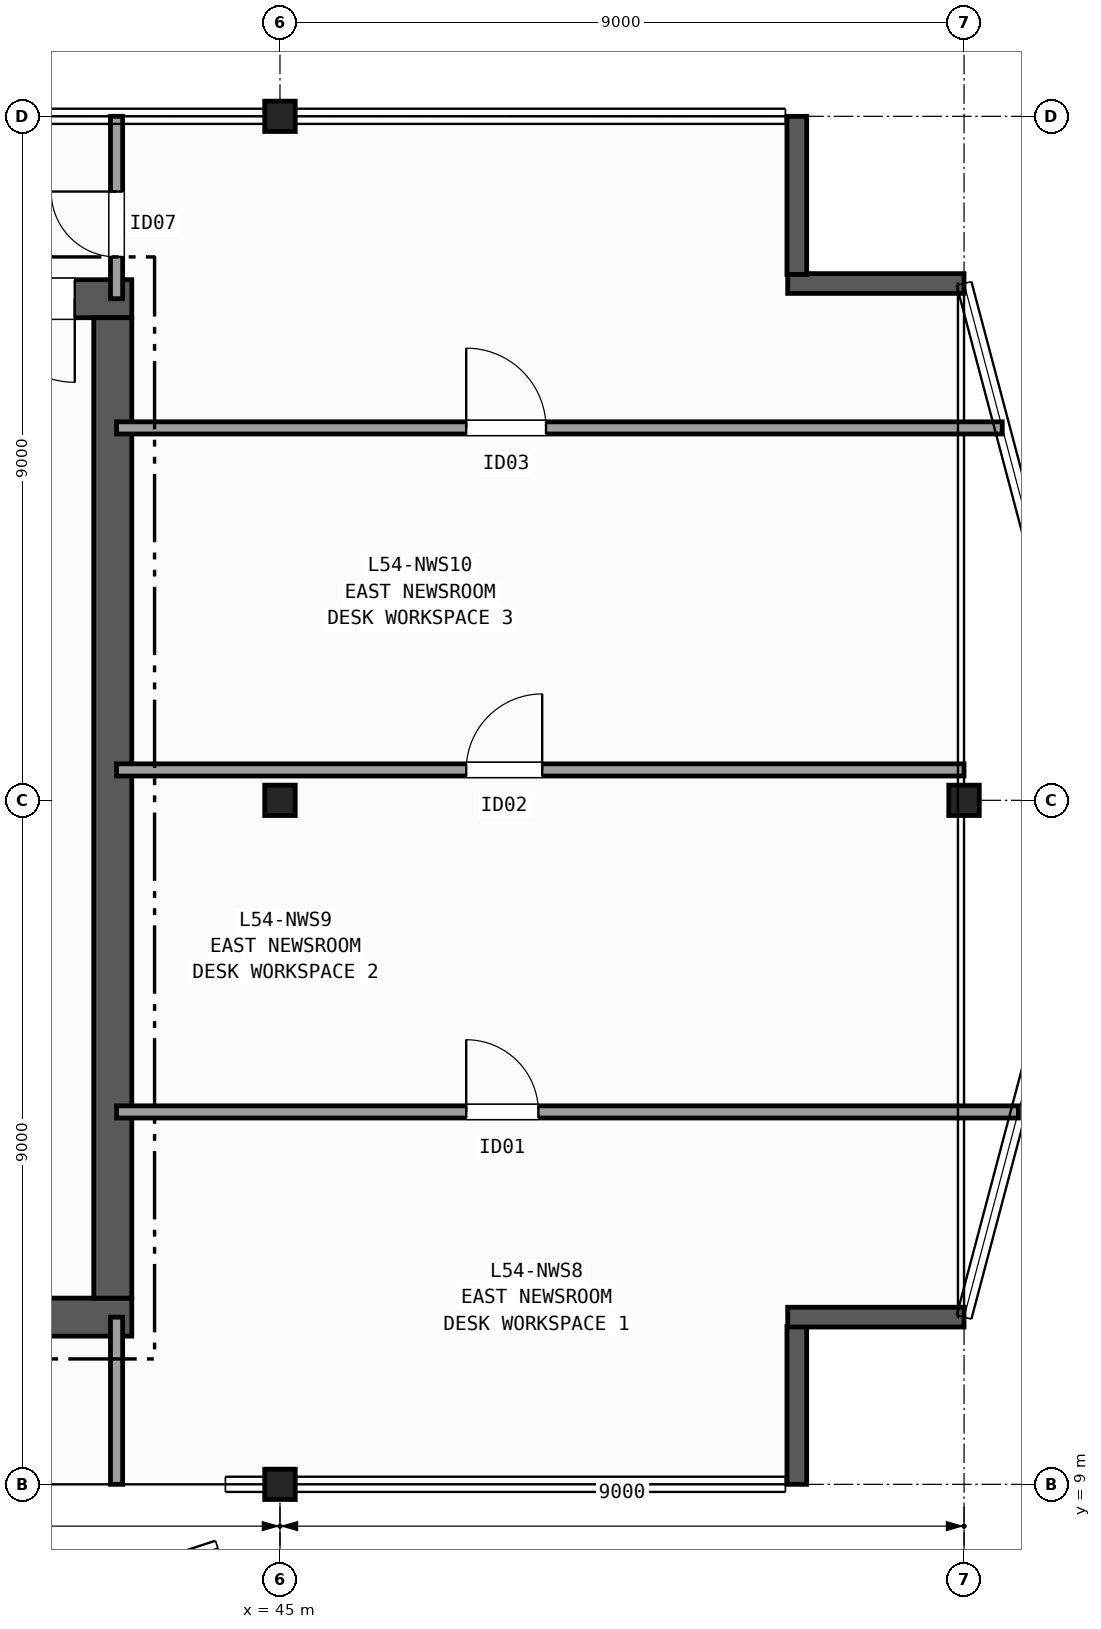
"""IFC4 building model, lengths in metres.
Left out: names, types, materials, properties, quantities, classifications, styles, units other than length and angle.
Written with IfcOpenShell. Run it as: python <this file> out.ifc"""

import sys

from ifc_helpers import new_model, si_unit, direction, frame, frame_2d, origin, origin_2d, place, context, subcontext, project, spatial, rectangle, i_section, extrude, element, fill, save


model = new_model("IFC4")
c1 = context("Model", 3, precision=1e-05, world=origin(), true_north=direction((0.0, 1.0)))
c2 = subcontext(c1, "Body", "Model", "MODEL_VIEW")
j1 = project(units=[si_unit("LENGTHUNIT", "METRE"), si_unit("PLANEANGLEUNIT", "RADIAN")], contexts=[c1])
p1 = place(None, origin())
s1 = spatial("IfcSite", under=j1, at=p1, CompositionType="ELEMENT")
p2 = place(p1, origin())
s2 = spatial("IfcBuilding", under=s1, at=p2, CompositionType="ELEMENT")
p3 = place(p2, frame((0.0, 0.0, 217.3)))
s3 = spatial("IfcBuildingStorey", under=s2, at=p3, CompositionType="ELEMENT", Elevation=217.3)
for number, where, z_axis, x_axis in (
    (1, (45.0, 9.0, 0.0), (0.0, 0.0, 1.0), (1.0, 0.0, 0.0)),
    (2, (45.0, 18.0, 0.0), (0.0, 0.0, 1.0), (1.0, 0.0, 0.0)),
    (3, (45.0, 27.0, 0.0), (0.0, 0.0, 1.0), (1.0, 0.0, 0.0)),
    (4, (54.0, 18.0, 0.0), (0.0, 0.0, 1.0), (1.0, 0.0, 0.0)),
):
    element("IfcColumn", number, at=place(p3, frame(where, z_axis=z_axis, x_axis=x_axis)), inside=s3, PredefinedType="COLUMN", context=c2, shape_type="SweptSolid", body=[
        extrude(i_section(OverallWidth=0.401, OverallDepth=0.399, WebThickness=0.025, FlangeThickness=0.04, FilletRadius=0.015, at=origin_2d()), origin(), (0.0, 0.0, 1.0), 3.7),
    ])
p4 = place(p3, frame((51.8, 9.0, 0.0), z_axis=(0.0, 0.0, 1.0), x_axis=(0.0, 1.0, 0.0)))
e5 = element("IfcWall", 5, at=p4, inside=s3, PredefinedType="SOLIDWALL", context=c2, shape_type="SweptSolid", body=[
    extrude(rectangle(XDim=2.08, YDim=0.26, at=frame_2d((1.04, 0.0))), origin(), (0.0, 0.0, 1.0), 3.42),
])
for number, where, z_axis, x_axis in (
    (6, (51.68, 11.2, 0.0), (0.0, 0.0, 1.0), (1.0, 0.0, 0.0)),
    (7, (54.0, 24.8, 0.0), (0.0, 0.0, 1.0), (-1.0, 0.0, 0.0)),
):
    element("IfcWall", number, at=place(p3, frame(where, z_axis=z_axis, x_axis=x_axis)), inside=s3, PredefinedType="SOLIDWALL", context=c2, shape_type="SweptSolid", body=[
        extrude(rectangle(XDim=2.32, YDim=0.26, at=frame_2d((1.16, 0.0))), origin(), (0.0, 0.0, 1.0), 3.42),
    ])
p5 = place(p3, frame((51.8, 24.92, 0.0), z_axis=(0.0, 0.0, 1.0), x_axis=(0.0, 1.0, 0.0)))
e8 = element("IfcWall", 8, at=p5, inside=s3, PredefinedType="SOLIDWALL", context=c2, shape_type="SweptSolid", body=[
    extrude(rectangle(XDim=2.08, YDim=0.26, at=frame_2d((1.04, 0.0))), origin(), (0.0, 0.0, 1.0), 3.42),
])
p6 = place(p3, frame((29.15, 11.2, 0.0), z_axis=(0.0, 0.0, 1.0), x_axis=(1.0, 0.0, 0.0)))
e9 = element("IfcWall", 9, at=p6, inside=s3, PredefinedType="SHEAR", context=c2, shape_type="SweptSolid", body=[
    extrude(rectangle(XDim=13.9, YDim=0.5, at=frame_2d((6.95, 0.0))), origin(), (0.0, 0.0, 1.0), 3.42),
])
p7 = place(p3, frame((43.05, 24.6, 0.0), z_axis=(0.0, 0.0, 1.0), x_axis=(-1.0, 0.0, 0.0)))
e10 = element("IfcWall", 10, at=p7, inside=s3, PredefinedType="SHEAR", context=c2, shape_type="SweptSolid", body=[
    extrude(rectangle(XDim=13.9, YDim=0.5, at=frame_2d((6.95, 0.0))), origin(), (0.0, 0.0, 1.0), 3.42),
])
p8 = place(p7, frame((0.75, 0.0, 0.0)))
e11 = element("IfcOpeningElement", 11, at=p8, cuts=e10, PredefinedType="OPENING", context=c2, shape_type="SweptSolid", body=[
    extrude(rectangle(XDim=1.1, YDim=2.15, at=frame_2d((0.55, 1.075))), frame((0.0, 0.26, 0.0), z_axis=(0.0, -1.0, 0.0), x_axis=(1.0, 0.0, 0.0)), (0.0, 0.0, 1.0), 0.52),
])
p9 = place(p7, frame((2.7, 0.0, 0.0)))
e12 = element("IfcOpeningElement", 12, at=p9, cuts=e10, PredefinedType="OPENING", context=c2, shape_type="SweptSolid", body=[
    extrude(rectangle(XDim=0.9, YDim=2.1, at=frame_2d((0.45, 1.05))), frame((0.0, 0.26, 0.0), z_axis=(0.0, -1.0, 0.0), x_axis=(1.0, 0.0, 0.0)), (0.0, 0.0, 1.0), 0.52),
])
p10 = place(p7, frame((4.6, 0.0, 0.0)))
e13 = element("IfcOpeningElement", 13, at=p10, cuts=e10, PredefinedType="OPENING", context=c2, shape_type="SweptSolid", body=[
    extrude(rectangle(XDim=0.9, YDim=2.1, at=frame_2d((0.45, 1.05))), frame((0.0, 0.26, 0.0), z_axis=(0.0, -1.0, 0.0), x_axis=(1.0, 0.0, 0.0)), (0.0, 0.0, 1.0), 0.52),
])
p11 = place(p3, frame((42.8, 11.45, 0.0), z_axis=(0.0, 0.0, 1.0), x_axis=(0.0, 1.0, 0.0)))
e14 = element("IfcWall", 14, at=p11, inside=s3, PredefinedType="SHEAR", context=c2, shape_type="SweptSolid", body=[
    extrude(rectangle(XDim=12.9, YDim=0.5, at=frame_2d((6.45, 0.0))), origin(), (0.0, 0.0, 1.0), 3.42),
])
p12 = place(p3, frame((42.85, 9.0, 0.0), z_axis=(0.0, 0.0, 1.0), x_axis=(0.0, 1.0, 0.0)))
e15 = element("IfcWall", 15, at=p12, inside=s3, PredefinedType="PARTITIONING", context=c2, shape_type="SweptSolid", body=[
    extrude(rectangle(XDim=2.2, YDim=0.16, at=frame_2d((1.1, 0.0))), origin(), (0.0, 0.0, 1.0), 2.707),
])
p13 = place(p3, frame((42.85, 24.6, 0.0), z_axis=(0.0, 0.0, 1.0), x_axis=(0.0, 1.0, 0.0)))
e16 = element("IfcWall", 16, at=p13, inside=s3, PredefinedType="PARTITIONING", context=c2, shape_type="SweptSolid", body=[
    extrude(rectangle(XDim=2.4, YDim=0.16, at=frame_2d((1.2, 0.0))), origin(), (0.0, 0.0, 1.0), 2.707),
])
p14 = place(p13, frame((0.55, 0.0, 0.0)))
e17 = element("IfcOpeningElement", 17, at=p14, cuts=e16, PredefinedType="OPENING", context=c2, shape_type="SweptSolid", body=[
    extrude(rectangle(XDim=0.86, YDim=2.05, at=frame_2d((0.43, 1.025))), frame((0.0, 0.09, 0.0), z_axis=(0.0, -1.0, 0.0), x_axis=(1.0, 0.0, 0.0)), (0.0, 0.0, 1.0), 0.18),
])
p15 = place(p3, frame((42.85, 13.9, 0.0), z_axis=(0.0, 0.0, 1.0), x_axis=(1.0, 0.0, 0.0)))
e18 = element("IfcWall", 18, at=p15, inside=s3, PredefinedType="PARTITIONING", context=c2, shape_type="SweptSolid", body=[
    extrude(rectangle(XDim=11.865, YDim=0.16, at=frame_2d((5.933, 0.0))), origin(), (0.0, 0.0, 1.0), 3.42),
])
p16 = place(p15, frame((4.6, 0.0, 0.0)))
e19 = element("IfcOpeningElement", 19, at=p16, cuts=e18, PredefinedType="OPENING", context=c2, shape_type="SweptSolid", body=[
    extrude(rectangle(XDim=0.95, YDim=2.1, at=frame_2d((0.475, 1.05))), frame((0.0, 0.09, 0.0), z_axis=(0.0, -1.0, 0.0), x_axis=(1.0, 0.0, 0.0)), (0.0, 0.0, 1.0), 0.18),
])
p17 = place(p3, frame((42.85, 18.4, 0.0), z_axis=(0.0, 0.0, 1.0), x_axis=(1.0, 0.0, 0.0)))
e20 = element("IfcWall", 20, at=p17, inside=s3, PredefinedType="PARTITIONING", context=c2, shape_type="SweptSolid", body=[
    extrude(rectangle(XDim=11.15, YDim=0.16, at=frame_2d((5.575, 0.0))), origin(), (0.0, 0.0, 1.0), 3.42),
])
p18 = place(p17, frame((4.6, 0.0, 0.0)))
e21 = element("IfcOpeningElement", 21, at=p18, cuts=e20, PredefinedType="OPENING", context=c2, shape_type="SweptSolid", body=[
    extrude(rectangle(XDim=1.0, YDim=2.1, at=frame_2d((0.5, 1.05))), frame((0.0, 0.09, 0.0), z_axis=(0.0, -1.0, 0.0), x_axis=(1.0, 0.0, 0.0)), (0.0, 0.0, 1.0), 0.18),
])
p19 = place(p3, frame((42.85, 22.9, 0.0), z_axis=(0.0, 0.0, 1.0), x_axis=(1.0, 0.0, 0.0)))
e22 = element("IfcWall", 22, at=p19, inside=s3, PredefinedType="PARTITIONING", context=c2, shape_type="SweptSolid", body=[
    extrude(rectangle(XDim=11.653, YDim=0.16, at=frame_2d((5.826, 0.0))), origin(), (0.0, 0.0, 1.0), 3.42),
])
p20 = place(p19, frame((4.6, 0.0, 0.0)))
e23 = element("IfcOpeningElement", 23, at=p20, cuts=e22, PredefinedType="OPENING", context=c2, shape_type="SweptSolid", body=[
    extrude(rectangle(XDim=1.05, YDim=2.15, at=frame_2d((0.525, 1.075))), frame((0.0, 0.09, 0.0), z_axis=(0.0, -1.0, 0.0), x_axis=(1.0, 0.0, 0.0)), (0.0, 0.0, 1.0), 0.18),
])
p21 = place(p8, origin())
e24 = element("IfcDoor", 24, at=p21, inside=s3, OperationType="SINGLE_SWING_LEFT", PredefinedType="DOOR", context=c2, shape_type="SweptSolid", body=[
    extrude(rectangle(XDim=1.1, YDim=2.15, at=frame_2d((0.55, 1.075))), frame((0.0, 0.025, 0.0), z_axis=(0.0, -1.0, 0.0), x_axis=(1.0, 0.0, 0.0)), (0.0, 0.0, 1.0), 0.05),
])
fill(e11, e24)
p22 = place(p14, origin())
e25 = element("IfcDoor", 25, at=p22, inside=s3, OperationType="SINGLE_SWING_RIGHT", PredefinedType="DOOR", context=c2, shape_type="SweptSolid", body=[
    extrude(rectangle(XDim=0.86, YDim=2.05, at=frame_2d((0.43, 1.025))), frame((0.0, 0.025, 0.0), z_axis=(0.0, -1.0, 0.0), x_axis=(1.0, 0.0, 0.0)), (0.0, 0.0, 1.0), 0.05),
])
fill(e17, e25)
p23 = place(p16, origin())
e26 = element("IfcDoor", 26, at=p23, inside=s3, OperationType="SINGLE_SWING_LEFT", PredefinedType="DOOR", context=c2, shape_type="SweptSolid", body=[
    extrude(rectangle(XDim=0.95, YDim=2.1, at=frame_2d((0.475, 1.05))), frame((0.0, 0.025, 0.0), z_axis=(0.0, -1.0, 0.0), x_axis=(1.0, 0.0, 0.0)), (0.0, 0.0, 1.0), 0.05),
])
fill(e19, e26)
p24 = place(p18, origin())
e27 = element("IfcDoor", 27, at=p24, inside=s3, OperationType="SINGLE_SWING_RIGHT", PredefinedType="DOOR", context=c2, shape_type="SweptSolid", body=[
    extrude(rectangle(XDim=1.0, YDim=2.1, at=frame_2d((0.5, 1.05))), frame((0.0, 0.025, 0.0), z_axis=(0.0, -1.0, 0.0), x_axis=(1.0, 0.0, 0.0)), (0.0, 0.0, 1.0), 0.05),
])
fill(e21, e27)
p25 = place(p20, origin())
e28 = element("IfcDoor", 28, at=p25, inside=s3, OperationType="SINGLE_SWING_LEFT", PredefinedType="DOOR", context=c2, shape_type="SweptSolid", body=[
    extrude(rectangle(XDim=1.05, YDim=2.15, at=frame_2d((0.525, 1.075))), frame((0.0, 0.025, 0.0), z_axis=(0.0, -1.0, 0.0), x_axis=(1.0, 0.0, 0.0)), (0.0, 0.0, 1.0), 0.05),
])
fill(e23, e28)
save(model, sys.argv[1])
